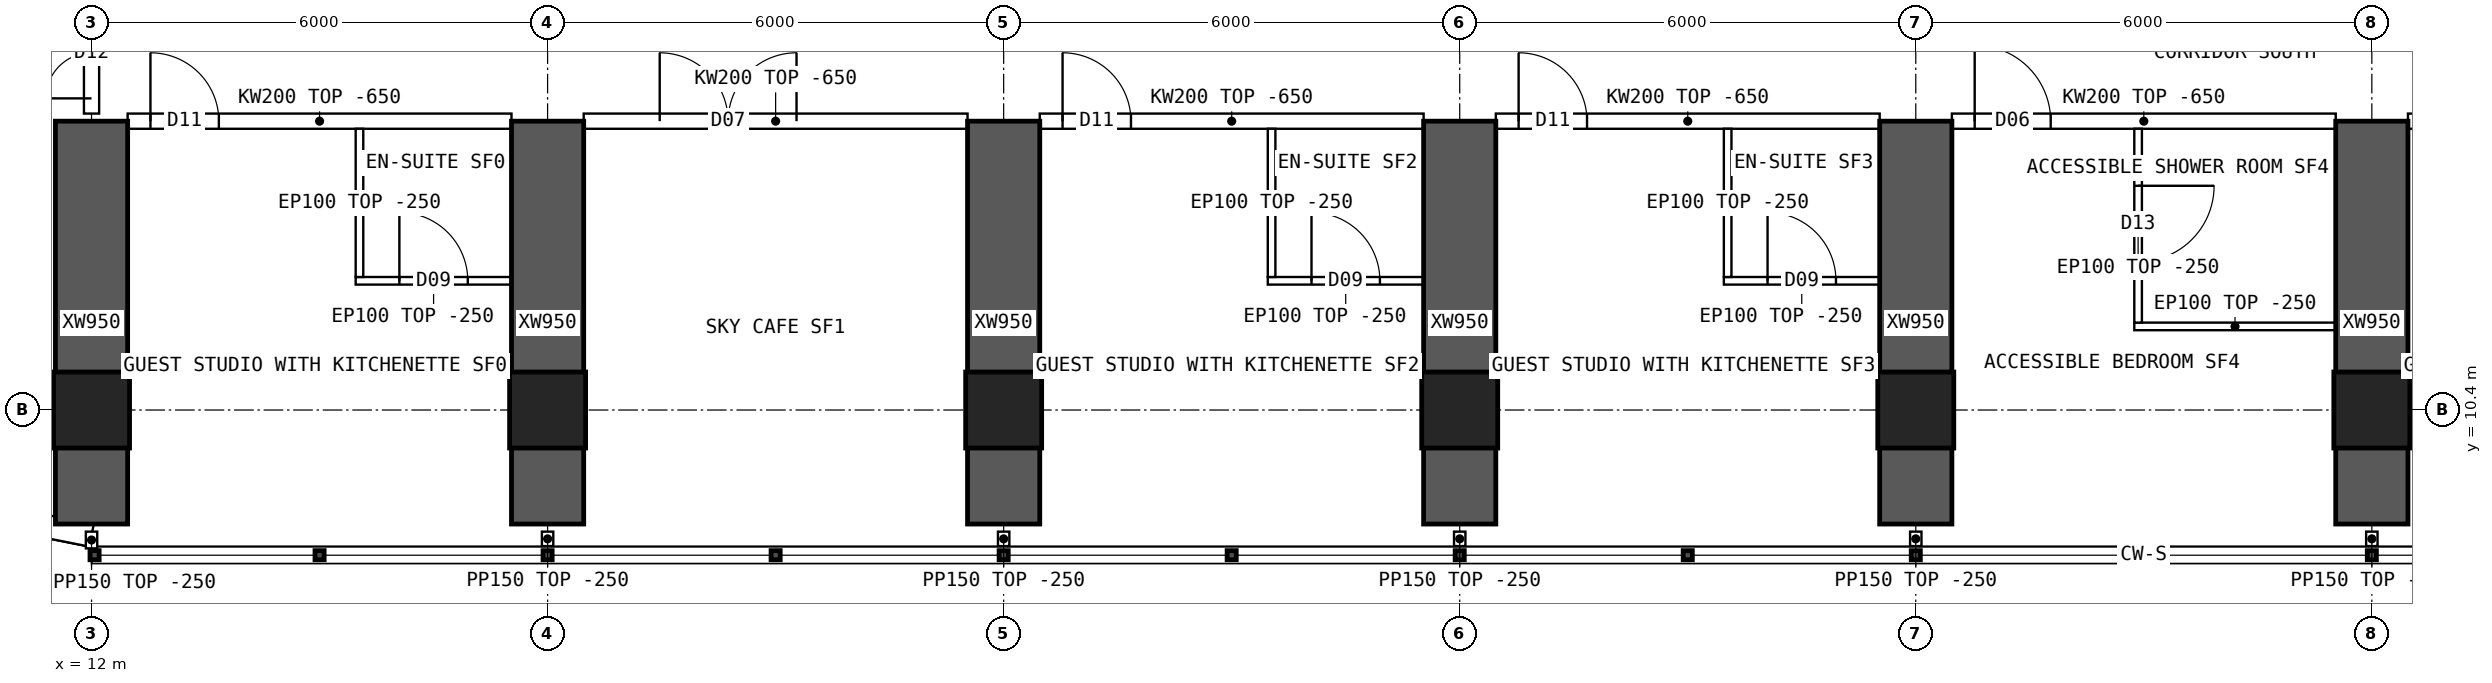
"""IFC4 building model, lengths in metres.
Left out: names, types, materials, properties, quantities, classifications, styles, units other than length and angle.
Written with IfcOpenShell. Run it as: python <this file> out.ifc"""

import sys

from ifc_helpers import new_model, si_unit, direction, frame, frame_2d, origin, origin_2d, place, context, subcontext, project, spatial, polyline, rectangle, hollow_rectangle, outline, extrude, element, fill, save


model = new_model("IFC4")
c1 = context("Model", 3, precision=1e-05, world=origin(), true_north=direction((0.0, 1.0)))
c2 = subcontext(c1, "Body", "Model", "MODEL_VIEW")
j1 = project(units=[si_unit("LENGTHUNIT", "METRE"), si_unit("PLANEANGLEUNIT", "RADIAN")], contexts=[c1])
p1 = place(None, origin())
s1 = spatial("IfcSite", under=j1, at=p1, CompositionType="ELEMENT")
p2 = place(p1, origin())
s2 = spatial("IfcBuilding", under=s1, at=p2, CompositionType="ELEMENT")
p3 = place(p2, frame((0.0, 0.0, 76.15)))
s3 = spatial("IfcBuildingStorey", under=s2, at=p3, CompositionType="ELEMENT", Elevation=76.15)
for number, where, z_axis, x_axis in (
    (1, (12.0, 10.4, 0.0), (0.0, 0.0, 1.0), (1.0, 0.0, 0.0)),
    (2, (18.0, 10.4, 0.0), (0.0, 0.0, 1.0), (1.0, 0.0, 0.0)),
    (3, (24.0, 10.4, 0.0), (0.0, 0.0, 1.0), (1.0, 0.0, 0.0)),
    (4, (30.0, 10.4, 0.0), (0.0, 0.0, 1.0), (1.0, 0.0, 0.0)),
    (5, (36.0, 10.4, 0.0), (0.0, 0.0, 1.0), (1.0, 0.0, 0.0)),
    (6, (42.0, 10.4, 0.0), (0.0, 0.0, 1.0), (1.0, 0.0, 0.0)),
):
    element("IfcColumn", number, at=place(p3, frame(where, z_axis=z_axis, x_axis=x_axis)), inside=s3, PredefinedType="COLUMN", context=c2, shape_type="SweptSolid", body=[
        extrude(hollow_rectangle(XDim=1.0, YDim=1.0, WallThickness=0.1, at=origin_2d()), origin(), (0.0, 0.0, 1.0), 4.5),
    ])
for number, where, z_axis, x_axis in (
    (7, (12.0, 8.9, 0.0), (0.0, 0.0, 1.0), (0.0, 1.0, 0.0)),
    (8, (18.0, 8.9, 0.0), (0.0, 0.0, 1.0), (0.0, 1.0, 0.0)),
    (9, (24.0, 8.9, 0.0), (0.0, 0.0, 1.0), (0.0, 1.0, 0.0)),
    (10, (30.0, 8.9, 0.0), (0.0, 0.0, 1.0), (0.0, 1.0, 0.0)),
    (11, (36.0, 8.9, 0.0), (0.0, 0.0, 1.0), (0.0, 1.0, 0.0)),
    (12, (42.0, 8.9, 0.0), (0.0, 0.0, 1.0), (0.0, 1.0, 0.0)),
):
    element("IfcWall", number, at=place(p3, frame(where, z_axis=z_axis, x_axis=x_axis)), inside=s3, PredefinedType="SHEAR", context=c2, shape_type="SweptSolid", body=[
        extrude(rectangle(XDim=5.3, YDim=0.95, at=frame_2d((2.65, 0.0))), origin(), (0.0, 0.0, 1.0), 4.5),
    ])
p4 = place(p3, frame((8.843, 9.378, 0.0), z_axis=(0.0, 0.0, 1.0), x_axis=(0.980787251524, -0.195080412259, 0.0)))
e13 = element("IfcWall", 13, at=p4, inside=s3, PredefinedType="SOLIDWALL", context=c2, shape_type="SweptSolid", body=[
    extrude(outline(polyline([(-0.03, -0.15), (3.249, -0.15), (3.189, 0.15), (0.03, 0.15), (-0.03, -0.15)])), origin(), (0.0, 0.0, 1.0), 4.25),
])
p5 = place(p4, frame((0.909, 0.0, 0.9)))
e14 = element("IfcOpeningElement", 14, at=p5, cuts=e13, PredefinedType="OPENING", context=c2, shape_type="SweptSolid", body=[
    extrude(rectangle(XDim=1.4, YDim=1.8, at=frame_2d((0.7, 0.9))), frame((0.0, 0.16, 0.0), z_axis=(0.0, -1.0, 0.0), x_axis=(1.0, 0.0, 0.0)), (0.0, 0.0, 1.0), 0.32),
])
p6 = place(p3, frame((12.015, 7.55, 0.0), z_axis=(0.0, 0.0, 1.0), x_axis=(-0.980792126237, 0.195055902531, 0.0)))
e15 = element("IfcWall", 15, at=p6, inside=s3, PredefinedType="PARAPET", context=c2, shape_type="SweptSolid", body=[
    extrude(rectangle(XDim=3.233, YDim=0.2, at=frame_2d((1.616, 0.0))), origin(), (0.0, 0.0, 1.0), 1.1),
])
p7 = place(p3, frame((12.475, 14.2, 0.0), z_axis=(0.0, 0.0, 1.0), x_axis=(1.0, 0.0, 0.0)))
e16 = element("IfcWall", 16, at=p7, inside=s3, PredefinedType="SOLIDWALL", context=c2, shape_type="SweptSolid", body=[
    extrude(outline(polyline([(0.0, 0.0), (5.05, 0.0), (5.05, 3.85), (0.0, 3.85), (0.0, 0.0)])), frame((0.0, 0.1, 0.0), z_axis=(0.0, -1.0, 0.0), x_axis=(1.0, 0.0, 0.0)), (0.0, 0.0, 1.0), 0.2),
])
p8 = place(p7, frame((0.3, 0.0, 0.0)))
e17 = element("IfcOpeningElement", 17, at=p8, cuts=e16, PredefinedType="OPENING", context=c2, shape_type="SweptSolid", body=[
    extrude(rectangle(XDim=0.9, YDim=2.1, at=frame_2d((0.45, 1.05))), frame((0.0, 0.11, 0.0), z_axis=(0.0, -1.0, 0.0), x_axis=(1.0, 0.0, 0.0)), (0.0, 0.0, 1.0), 0.22),
])
p9 = place(p3, frame((18.475, 14.2, 0.0), z_axis=(0.0, 0.0, 1.0), x_axis=(1.0, 0.0, 0.0)))
e18 = element("IfcWall", 18, at=p9, inside=s3, PredefinedType="SOLIDWALL", context=c2, shape_type="SweptSolid", body=[
    extrude(outline(polyline([(0.0, 0.0), (5.05, 0.0), (5.05, 3.85), (0.0, 3.85), (0.0, 0.0)])), frame((0.0, 0.1, 0.0), z_axis=(0.0, -1.0, 0.0), x_axis=(1.0, 0.0, 0.0)), (0.0, 0.0, 1.0), 0.2),
])
p10 = place(p9, frame((1.0, 0.0, 0.0)))
e19 = element("IfcOpeningElement", 19, at=p10, cuts=e18, PredefinedType="OPENING", context=c2, shape_type="SweptSolid", body=[
    extrude(rectangle(XDim=1.8, YDim=2.1, at=frame_2d((0.9, 1.05))), frame((0.0, 0.11, 0.0), z_axis=(0.0, -1.0, 0.0), x_axis=(1.0, 0.0, 0.0)), (0.0, 0.0, 1.0), 0.22),
])
p11 = place(p3, frame((24.475, 14.2, 0.0), z_axis=(0.0, 0.0, 1.0), x_axis=(1.0, 0.0, 0.0)))
e20 = element("IfcWall", 20, at=p11, inside=s3, PredefinedType="SOLIDWALL", context=c2, shape_type="SweptSolid", body=[
    extrude(outline(polyline([(0.0, 0.0), (5.05, 0.0), (5.05, 3.85), (0.0, 3.85), (0.0, 0.0)])), frame((0.0, 0.1, 0.0), z_axis=(0.0, -1.0, 0.0), x_axis=(1.0, 0.0, 0.0)), (0.0, 0.0, 1.0), 0.2),
])
p12 = place(p11, frame((0.3, 0.0, 0.0)))
e21 = element("IfcOpeningElement", 21, at=p12, cuts=e20, PredefinedType="OPENING", context=c2, shape_type="SweptSolid", body=[
    extrude(rectangle(XDim=0.9, YDim=2.1, at=frame_2d((0.45, 1.05))), frame((0.0, 0.11, 0.0), z_axis=(0.0, -1.0, 0.0), x_axis=(1.0, 0.0, 0.0)), (0.0, 0.0, 1.0), 0.22),
])
p13 = place(p3, frame((30.475, 14.2, 0.0), z_axis=(0.0, 0.0, 1.0), x_axis=(1.0, 0.0, 0.0)))
e22 = element("IfcWall", 22, at=p13, inside=s3, PredefinedType="SOLIDWALL", context=c2, shape_type="SweptSolid", body=[
    extrude(outline(polyline([(0.0, 0.0), (5.05, 0.0), (5.05, 3.85), (0.0, 3.85), (0.0, 0.0)])), frame((0.0, 0.1, 0.0), z_axis=(0.0, -1.0, 0.0), x_axis=(1.0, 0.0, 0.0)), (0.0, 0.0, 1.0), 0.2),
])
p14 = place(p13, frame((0.3, 0.0, 0.0)))
e23 = element("IfcOpeningElement", 23, at=p14, cuts=e22, PredefinedType="OPENING", context=c2, shape_type="SweptSolid", body=[
    extrude(rectangle(XDim=0.9, YDim=2.1, at=frame_2d((0.45, 1.05))), frame((0.0, 0.11, 0.0), z_axis=(0.0, -1.0, 0.0), x_axis=(1.0, 0.0, 0.0)), (0.0, 0.0, 1.0), 0.22),
])
p15 = place(p3, frame((36.475, 14.2, 0.0), z_axis=(0.0, 0.0, 1.0), x_axis=(1.0, 0.0, 0.0)))
e24 = element("IfcWall", 24, at=p15, inside=s3, PredefinedType="SOLIDWALL", context=c2, shape_type="SweptSolid", body=[
    extrude(outline(polyline([(0.0, 0.0), (5.05, 0.0), (5.05, 3.85), (0.0, 3.85), (0.0, 0.0)])), frame((0.0, 0.1, 0.0), z_axis=(0.0, -1.0, 0.0), x_axis=(1.0, 0.0, 0.0)), (0.0, 0.0, 1.0), 0.2),
])
p16 = place(p15, frame((0.3, 0.0, 0.0)))
e25 = element("IfcOpeningElement", 25, at=p16, cuts=e24, PredefinedType="OPENING", context=c2, shape_type="SweptSolid", body=[
    extrude(rectangle(XDim=1.0, YDim=2.1, at=frame_2d((0.5, 1.05))), frame((0.0, 0.11, 0.0), z_axis=(0.0, -1.0, 0.0), x_axis=(1.0, 0.0, 0.0)), (0.0, 0.0, 1.0), 0.22),
])
p17 = place(p3, frame((42.475, 14.2, 0.0), z_axis=(0.0, 0.0, 1.0), x_axis=(1.0, 0.0, 0.0)))
e26 = element("IfcWall", 26, at=p17, inside=s3, PredefinedType="SOLIDWALL", context=c2, shape_type="SweptSolid", body=[
    extrude(outline(polyline([(0.0, 0.0), (5.05, 0.0), (5.05, 3.85), (0.0, 3.85), (0.0, 0.0)])), frame((0.0, 0.1, 0.0), z_axis=(0.0, -1.0, 0.0), x_axis=(1.0, 0.0, 0.0)), (0.0, 0.0, 1.0), 0.2),
])
p18 = place(p17, frame((0.3, 0.0, 0.0)))
e27 = element("IfcOpeningElement", 27, at=p18, cuts=e26, PredefinedType="OPENING", context=c2, shape_type="SweptSolid", body=[
    extrude(rectangle(XDim=0.9, YDim=2.1, at=frame_2d((0.45, 1.05))), frame((0.0, 0.11, 0.0), z_axis=(0.0, -1.0, 0.0), x_axis=(1.0, 0.0, 0.0)), (0.0, 0.0, 1.0), 0.22),
])
p19 = place(p3, frame((17.525, 12.1, 0.0), z_axis=(0.0, 0.0, 1.0), x_axis=(-1.0, 0.0, 0.0)))
e28 = element("IfcWall", 28, at=p19, inside=s3, PredefinedType="PARTITIONING", context=c2, shape_type="SweptSolid", body=[
    extrude(rectangle(XDim=2.05, YDim=0.1, at=frame_2d((1.025, 0.0))), origin(), (0.0, 0.0, 1.0), 4.25),
])
p20 = place(p19, frame((0.575, 0.0, 0.0)))
e29 = element("IfcOpeningElement", 29, at=p20, cuts=e28, PredefinedType="OPENING", context=c2, shape_type="SweptSolid", body=[
    extrude(rectangle(XDim=0.9, YDim=2.1, at=frame_2d((0.45, 1.05))), frame((0.0, 0.06, 0.0), z_axis=(0.0, -1.0, 0.0), x_axis=(1.0, 0.0, 0.0)), (0.0, 0.0, 1.0), 0.12),
])
p21 = place(p3, frame((15.525, 12.15, 0.0), z_axis=(0.0, 0.0, 1.0), x_axis=(0.0, 1.0, 0.0)))
e30 = element("IfcWall", 30, at=p21, inside=s3, PredefinedType="PARTITIONING", context=c2, shape_type="SweptSolid", body=[
    extrude(outline(polyline([(0.0, 0.0), (1.95, 0.0), (1.95, 3.85), (1.902, 3.85), (1.9, 4.25), (0.0, 4.25), (0.0, 0.0)])), frame((0.0, 0.05, 0.0), z_axis=(0.0, -1.0, 0.0), x_axis=(1.0, 0.0, 0.0)), (0.0, 0.0, 1.0), 0.1),
])
p22 = place(p3, frame((29.525, 12.1, 0.0), z_axis=(0.0, 0.0, 1.0), x_axis=(-1.0, 0.0, 0.0)))
e31 = element("IfcWall", 31, at=p22, inside=s3, PredefinedType="PARTITIONING", context=c2, shape_type="SweptSolid", body=[
    extrude(rectangle(XDim=2.05, YDim=0.1, at=frame_2d((1.025, 0.0))), origin(), (0.0, 0.0, 1.0), 4.25),
])
p23 = place(p22, frame((0.575, 0.0, 0.0)))
e32 = element("IfcOpeningElement", 32, at=p23, cuts=e31, PredefinedType="OPENING", context=c2, shape_type="SweptSolid", body=[
    extrude(rectangle(XDim=0.9, YDim=2.1, at=frame_2d((0.45, 1.05))), frame((0.0, 0.06, 0.0), z_axis=(0.0, -1.0, 0.0), x_axis=(1.0, 0.0, 0.0)), (0.0, 0.0, 1.0), 0.12),
])
p24 = place(p3, frame((27.525, 12.15, 0.0), z_axis=(0.0, 0.0, 1.0), x_axis=(0.0, 1.0, 0.0)))
e33 = element("IfcWall", 33, at=p24, inside=s3, PredefinedType="PARTITIONING", context=c2, shape_type="SweptSolid", body=[
    extrude(outline(polyline([(0.0, 0.0), (1.95, 0.0), (1.95, 3.85), (1.902, 3.85), (1.9, 4.25), (0.0, 4.25), (0.0, 0.0)])), frame((0.0, 0.05, 0.0), z_axis=(0.0, -1.0, 0.0), x_axis=(1.0, 0.0, 0.0)), (0.0, 0.0, 1.0), 0.1),
])
p25 = place(p3, frame((35.525, 12.1, 0.0), z_axis=(0.0, 0.0, 1.0), x_axis=(-1.0, 0.0, 0.0)))
e34 = element("IfcWall", 34, at=p25, inside=s3, PredefinedType="PARTITIONING", context=c2, shape_type="SweptSolid", body=[
    extrude(rectangle(XDim=2.05, YDim=0.1, at=frame_2d((1.025, 0.0))), origin(), (0.0, 0.0, 1.0), 4.25),
])
p26 = place(p25, frame((0.575, 0.0, 0.0)))
e35 = element("IfcOpeningElement", 35, at=p26, cuts=e34, PredefinedType="OPENING", context=c2, shape_type="SweptSolid", body=[
    extrude(rectangle(XDim=0.9, YDim=2.1, at=frame_2d((0.45, 1.05))), frame((0.0, 0.06, 0.0), z_axis=(0.0, -1.0, 0.0), x_axis=(1.0, 0.0, 0.0)), (0.0, 0.0, 1.0), 0.12),
])
p27 = place(p3, frame((33.525, 12.15, 0.0), z_axis=(0.0, 0.0, 1.0), x_axis=(0.0, 1.0, 0.0)))
e36 = element("IfcWall", 36, at=p27, inside=s3, PredefinedType="PARTITIONING", context=c2, shape_type="SweptSolid", body=[
    extrude(outline(polyline([(0.0, 0.0), (1.95, 0.0), (1.95, 3.85), (1.902, 3.85), (1.9, 4.25), (0.0, 4.25), (0.0, 0.0)])), frame((0.0, 0.05, 0.0), z_axis=(0.0, -1.0, 0.0), x_axis=(1.0, 0.0, 0.0)), (0.0, 0.0, 1.0), 0.1),
])
p28 = place(p3, frame((38.875, 11.5, 0.0), z_axis=(0.0, 0.0, 1.0), x_axis=(1.0, 0.0, 0.0)))
e37 = element("IfcWall", 37, at=p28, inside=s3, PredefinedType="PARTITIONING", context=c2, shape_type="SweptSolid", body=[
    extrude(rectangle(XDim=2.65, YDim=0.1, at=frame_2d((1.325, 0.0))), origin(), (0.0, 0.0, 1.0), 4.25),
])
p29 = place(p3, frame((38.925, 11.55, 0.0), z_axis=(0.0, 0.0, 1.0), x_axis=(0.0, 1.0, 0.0)))
e38 = element("IfcWall", 38, at=p29, inside=s3, PredefinedType="PARTITIONING", context=c2, shape_type="SweptSolid", body=[
    extrude(outline(polyline([(0.0, 0.0), (2.55, 0.0), (2.55, 3.85), (2.502, 3.85), (2.5, 4.25), (0.0, 4.25), (0.0, 0.0)])), frame((0.0, 0.05, 0.0), z_axis=(0.0, -1.0, 0.0), x_axis=(1.0, 0.0, 0.0)), (0.0, 0.0, 1.0), 0.1),
])
p30 = place(p29, frame((0.8, 0.0, 0.0)))
e39 = element("IfcOpeningElement", 39, at=p30, cuts=e38, PredefinedType="OPENING", context=c2, shape_type="SweptSolid", body=[
    extrude(rectangle(XDim=1.0, YDim=2.1, at=frame_2d((0.5, 1.05))), frame((0.0, 0.06, 0.0), z_axis=(0.0, -1.0, 0.0), x_axis=(1.0, 0.0, 0.0)), (0.0, 0.0, 1.0), 0.12),
])
p31 = place(p3, frame((12.0, 14.3, 0.0), z_axis=(0.0, 0.0, 1.0), x_axis=(0.0, 1.0, 0.0)))
e40 = element("IfcWall", 40, at=p31, inside=s3, PredefinedType="SOLIDWALL", context=c2, shape_type="SweptSolid", body=[
    extrude(outline(polyline([(0.0, 0.0), (1.6, 0.0), (1.6, 3.85), (0.0, 3.85), (0.0, 0.0)])), frame((0.0, 0.1, 0.0), z_axis=(0.0, -1.0, 0.0), x_axis=(1.0, 0.0, 0.0)), (0.0, 0.0, 1.0), 0.2),
])
p32 = place(p31, frame((0.2, 0.0, 0.0)))
e41 = element("IfcOpeningElement", 41, at=p32, cuts=e40, PredefinedType="OPENING", context=c2, shape_type="SweptSolid", body=[
    extrude(rectangle(XDim=1.2, YDim=2.1, at=frame_2d((0.6, 1.05))), frame((0.0, 0.11, 0.0), z_axis=(0.0, -1.0, 0.0), x_axis=(1.0, 0.0, 0.0)), (0.0, 0.0, 1.0), 0.22),
])
p33 = place(p3, frame((12.0, 8.8, 0.0), z_axis=(0.0, 0.0, 1.0), x_axis=(0.0, -1.0, 0.0)))
e42 = element("IfcWall", 42, at=p33, inside=s3, PredefinedType="PARTITIONING", context=c2, shape_type="SweptSolid", body=[
    extrude(rectangle(XDim=0.22, YDim=0.15, at=frame_2d((0.11, 0.0))), origin(), (0.0, 0.0, 1.0), 4.25),
])
for number, where, z_axis, x_axis in (
    (43, (18.0, 8.8, 0.0), (0.0, 0.0, 1.0), (0.0, -1.0, 0.0)),
    (44, (24.0, 8.8, 0.0), (0.0, 0.0, 1.0), (0.0, -1.0, 0.0)),
    (45, (30.0, 8.8, 0.0), (0.0, 0.0, 1.0), (0.0, -1.0, 0.0)),
    (46, (36.0, 8.8, 0.0), (0.0, 0.0, 1.0), (0.0, -1.0, 0.0)),
    (47, (42.0, 8.8, 0.0), (0.0, 0.0, 1.0), (0.0, -1.0, 0.0)),
):
    element("IfcWall", number, at=place(p3, frame(where, z_axis=z_axis, x_axis=x_axis)), inside=s3, PredefinedType="PARTITIONING", context=c2, shape_type="SweptSolid", body=[
        extrude(rectangle(XDim=0.19, YDim=0.15, at=frame_2d((0.095, 0.0))), origin(), (0.0, 0.0, 1.0), 4.25),
    ])
p34 = place(p20, origin())
e48 = element("IfcDoor", 48, at=p34, inside=s3, OperationType="SINGLE_SWING_RIGHT", PredefinedType="DOOR", context=c2, shape_type="SweptSolid", body=[
    extrude(rectangle(XDim=0.9, YDim=2.1, at=frame_2d((0.45, 1.05))), frame((0.0, 0.025, 0.0), z_axis=(0.0, -1.0, 0.0), x_axis=(1.0, 0.0, 0.0)), (0.0, 0.0, 1.0), 0.05),
])
fill(e29, e48)
p35 = place(p8, origin())
e49 = element("IfcDoor", 49, at=p35, inside=s3, OperationType="SINGLE_SWING_LEFT", PredefinedType="DOOR", context=c2, shape_type="SweptSolid", body=[
    extrude(rectangle(XDim=0.9, YDim=2.1, at=frame_2d((0.45, 1.05))), frame((0.0, 0.025, 0.0), z_axis=(0.0, -1.0, 0.0), x_axis=(1.0, 0.0, 0.0)), (0.0, 0.0, 1.0), 0.05),
])
fill(e17, e49)
p36 = place(p10, origin())
e50 = element("IfcDoor", 50, at=p36, inside=s3, OperationType="DOUBLE_DOOR_SINGLE_SWING", PredefinedType="DOOR", context=c2, shape_type="SweptSolid", body=[
    extrude(rectangle(XDim=1.8, YDim=2.1, at=frame_2d((0.9, 1.05))), frame((0.0, 0.025, 0.0), z_axis=(0.0, -1.0, 0.0), x_axis=(1.0, 0.0, 0.0)), (0.0, 0.0, 1.0), 0.05),
])
fill(e19, e50)
p37 = place(p23, origin())
e51 = element("IfcDoor", 51, at=p37, inside=s3, OperationType="SINGLE_SWING_RIGHT", PredefinedType="DOOR", context=c2, shape_type="SweptSolid", body=[
    extrude(rectangle(XDim=0.9, YDim=2.1, at=frame_2d((0.45, 1.05))), frame((0.0, 0.025, 0.0), z_axis=(0.0, -1.0, 0.0), x_axis=(1.0, 0.0, 0.0)), (0.0, 0.0, 1.0), 0.05),
])
fill(e32, e51)
p38 = place(p12, origin())
e52 = element("IfcDoor", 52, at=p38, inside=s3, OperationType="SINGLE_SWING_LEFT", PredefinedType="DOOR", context=c2, shape_type="SweptSolid", body=[
    extrude(rectangle(XDim=0.9, YDim=2.1, at=frame_2d((0.45, 1.05))), frame((0.0, 0.025, 0.0), z_axis=(0.0, -1.0, 0.0), x_axis=(1.0, 0.0, 0.0)), (0.0, 0.0, 1.0), 0.05),
])
fill(e21, e52)
p39 = place(p26, origin())
e53 = element("IfcDoor", 53, at=p39, inside=s3, OperationType="SINGLE_SWING_RIGHT", PredefinedType="DOOR", context=c2, shape_type="SweptSolid", body=[
    extrude(rectangle(XDim=0.9, YDim=2.1, at=frame_2d((0.45, 1.05))), frame((0.0, 0.025, 0.0), z_axis=(0.0, -1.0, 0.0), x_axis=(1.0, 0.0, 0.0)), (0.0, 0.0, 1.0), 0.05),
])
fill(e35, e53)
p40 = place(p14, origin())
e54 = element("IfcDoor", 54, at=p40, inside=s3, OperationType="SINGLE_SWING_LEFT", PredefinedType="DOOR", context=c2, shape_type="SweptSolid", body=[
    extrude(rectangle(XDim=0.9, YDim=2.1, at=frame_2d((0.45, 1.05))), frame((0.0, 0.025, 0.0), z_axis=(0.0, -1.0, 0.0), x_axis=(1.0, 0.0, 0.0)), (0.0, 0.0, 1.0), 0.05),
])
fill(e23, e54)
p41 = place(p30, origin())
e55 = element("IfcDoor", 55, at=p41, inside=s3, OperationType="SINGLE_SWING_RIGHT", PredefinedType="DOOR", context=c2, shape_type="SweptSolid", body=[
    extrude(rectangle(XDim=1.0, YDim=2.1, at=frame_2d((0.5, 1.05))), frame((0.0, 0.025, 0.0), z_axis=(0.0, -1.0, 0.0), x_axis=(1.0, 0.0, 0.0)), (0.0, 0.0, 1.0), 0.05),
])
fill(e39, e55)
p42 = place(p16, origin())
e56 = element("IfcDoor", 56, at=p42, inside=s3, OperationType="SINGLE_SWING_LEFT", PredefinedType="DOOR", context=c2, shape_type="SweptSolid", body=[
    extrude(rectangle(XDim=1.0, YDim=2.1, at=frame_2d((0.5, 1.05))), frame((0.0, 0.025, 0.0), z_axis=(0.0, -1.0, 0.0), x_axis=(1.0, 0.0, 0.0)), (0.0, 0.0, 1.0), 0.05),
])
fill(e25, e56)
p43 = place(p32, origin())
e57 = element("IfcDoor", 57, at=p43, inside=s3, OperationType="DOUBLE_DOOR_SINGLE_SWING", PredefinedType="DOOR", context=c2, shape_type="SweptSolid", body=[
    extrude(rectangle(XDim=1.2, YDim=2.1, at=frame_2d((0.6, 1.05))), frame((0.0, 0.025, 0.0), z_axis=(0.0, -1.0, 0.0), x_axis=(1.0, 0.0, 0.0)), (0.0, 0.0, 1.0), 0.05),
])
fill(e41, e57)
save(model, sys.argv[1])
